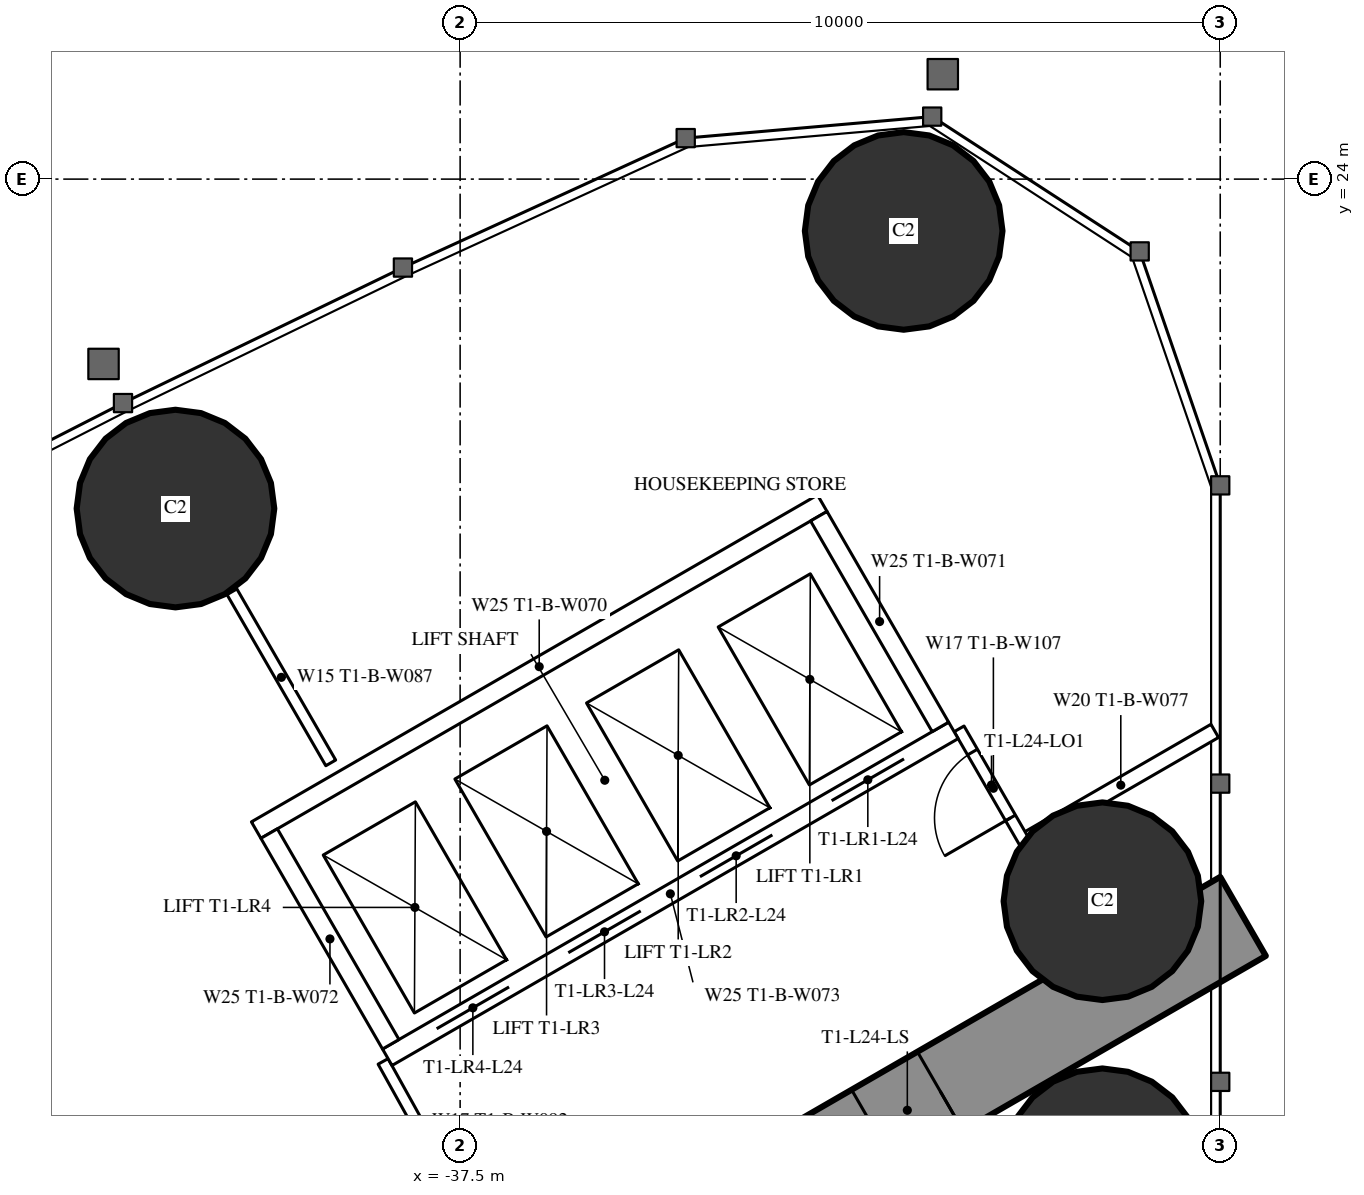
"""IFC4 building model, lengths in metres.
Left out: names, types, materials, properties, quantities, classifications, styles, units other than length and angle.
Written with IfcOpenShell. Run it as: python <this file> out.ifc"""

import sys

from ifc_helpers import new_model, si_unit, direction, frame, frame_2d, origin, origin_2d, place, context, subcontext, project, spatial, rectangle, hollow_circle, extrude, element, fill, save


model = new_model("IFC4")
c1 = context("Model", 3, precision=1e-05, world=origin(), true_north=direction((0.0, 1.0)))
c2 = subcontext(c1, "Body", "Model", "MODEL_VIEW")
j1 = project(units=[si_unit("LENGTHUNIT", "METRE"), si_unit("PLANEANGLEUNIT", "RADIAN")], contexts=[c1])
p1 = place(None, origin())
s1 = spatial("IfcSite", under=j1, at=p1, CompositionType="ELEMENT")
p2 = place(p1, origin())
s2 = spatial("IfcBuilding", under=s1, at=p2, CompositionType="ELEMENT")
p3 = place(p2, frame((0.0, 0.0, 94.1)))
s3 = spatial("IfcBuildingStorey", under=s2, at=p3, CompositionType="ELEMENT", Elevation=94.1)
for number, where, z_axis, x_axis in (
    (1, (-31.665, 23.318, 0.0), (0.0, 0.0, 1.0), (1.0, 0.0, 0.0)),
    (2, (-29.05, 11.0, 0.0), (0.0, 0.0, 1.0), (1.0, 0.0, 0.0)),
    (3, (-29.05, 14.5, 0.0), (0.0, 0.0, 1.0), (1.0, 0.0, 0.0)),
    (4, (-41.245, 19.666, 0.0), (0.0, 0.0, 1.0), (1.0, 0.0, 0.0)),
):
    element("IfcColumn", number, at=place(p3, frame(where, z_axis=z_axis, x_axis=x_axis)), inside=s3, PredefinedType="COLUMN", context=c2, shape_type="SweptSolid", body=[
        extrude(hollow_circle(Radius=1.3, WallThickness=0.1, at=origin_2d()), origin(), (0.0, 0.0, 1.0), 3.5),
    ])
p4 = place(p3, frame((-27.2, 14.3, 0.0), z_axis=(0.0, 0.0, 1.0), x_axis=(-0.866026593062, -0.499997940104, 0.0)))
e5 = element("IfcWall", 5, at=p4, inside=s3, PredefinedType="SHEAR", context=c2, shape_type="SweptSolid", body=[
    extrude(rectangle(XDim=28.946, YDim=1.2, at=frame_2d((14.473, 0.0))), origin(), (0.0, 0.0, 1.0), 3.5),
])
p5 = place(p4, frame((4.6, 0.0, 0.0)))
e6 = element("IfcOpeningElement", 6, at=p5, cuts=e5, PredefinedType="OPENING", context=c2, shape_type="SweptSolid", body=[
    extrude(rectangle(XDim=1.0, YDim=2.2, at=frame_2d((0.5, 1.1))), frame((0.0, 0.61, 0.0), z_axis=(0.0, -1.0, 0.0), x_axis=(1.0, 0.0, 0.0)), (0.0, 0.0, 1.0), 1.22),
])
p6 = place(p4, frame((13.395, 0.0, 0.0)))
e7 = element("IfcOpeningElement", 7, at=p6, cuts=e5, PredefinedType="OPENING", context=c2, shape_type="SweptSolid", body=[
    extrude(rectangle(XDim=1.8, YDim=2.2, at=frame_2d((0.9, 1.1))), frame((0.0, 0.61, 0.0), z_axis=(0.0, -1.0, 0.0), x_axis=(1.0, 0.0, 0.0)), (0.0, 0.0, 1.0), 1.22),
])
p7 = place(p3, frame((-39.202, 16.32, 0.0), z_axis=(0.0, 0.0, 1.0), x_axis=(-0.499947391036, 0.866055775454, 0.0)))
e8 = element("IfcWall", 8, at=p7, inside=s3, PredefinedType="PARTITIONING", context=c2, shape_type="SweptSolid", body=[
    extrude(rectangle(XDim=2.599, YDim=0.15, at=frame_2d((1.3, 0.0))), origin(), (0.0, 0.0, 1.0), 3.25),
])
p8 = place(p3, frame((-27.572, 16.741, 0.0), z_axis=(0.0, 0.0, 1.0), x_axis=(-0.866034618596, -0.499984039138, 0.0)))
e9 = element("IfcWall", 9, at=p8, inside=s3, PredefinedType="PARTITIONING", context=c2, shape_type="SweptSolid", body=[
    extrude(rectangle(XDim=2.854, YDim=0.2, at=frame_2d((1.427, 0.0))), origin(), (0.0, 0.0, 1.0), 3.25),
])
p9 = place(p3, frame((-38.513, 12.392, 0.0), z_axis=(0.0, 0.0, 1.0), x_axis=(0.485585508183, -0.874189175317, 0.0)))
e10 = element("IfcWall", 10, at=p9, inside=s3, PredefinedType="PARTITIONING", context=c2, shape_type="SweptSolid", body=[
    extrude(rectangle(XDim=1.805, YDim=0.15, at=frame_2d((0.902, 0.0))), origin(), (0.0, 0.0, 1.0), 3.25),
])
p10 = place(p3, frame((-30.033, 15.205, 0.0), z_axis=(0.0, 0.0, 1.0), x_axis=(-0.499980071345, 0.866036909293, 0.0)))
e11 = element("IfcWall", 11, at=p10, inside=s3, PredefinedType="PARTITIONING", context=c2, shape_type="SweptSolid", body=[
    extrude(rectangle(XDim=1.805, YDim=0.15, at=frame_2d((0.902, 0.0))), origin(), (0.0, 0.0, 1.0), 2.2),
])
p11 = place(p10, frame((0.452, 0.0, 0.0)))
e12 = element("IfcOpeningElement", 12, at=p11, cuts=e11, PredefinedType="OPENING", context=c2, shape_type="SweptSolid", body=[
    extrude(rectangle(XDim=1.0, YDim=2.2, at=frame_2d((0.5, 1.1))), frame((0.0, 0.085, 0.0), z_axis=(0.0, -1.0, 0.0), x_axis=(1.0, 0.0, 0.0)), (0.0, 0.0, 1.0), 0.17),
])
p12 = place(p3, frame((-31.01, 16.747, 0.0), z_axis=(0.0, 0.0, 1.0), x_axis=(-0.866028165386, -0.499995216735, 0.0)))
e13 = element("IfcWall", 13, at=p12, inside=s3, PredefinedType="PARTITIONING", context=c2, shape_type="SweptSolid", body=[
    extrude(rectangle(XDim=8.6, YDim=0.25, at=frame_2d((4.3, 0.0))), origin(), (0.0, 0.0, 1.0), 3.25),
])
p13 = place(p12, frame((0.75, 0.0, 0.0)))
e14 = element("IfcOpeningElement", 14, at=p13, cuts=e13, PredefinedType="OPENING", context=c2, shape_type="SweptSolid", body=[
    extrude(rectangle(XDim=1.1, YDim=2.2, at=frame_2d((0.55, 1.1))), frame((0.0, 0.135, 0.0), z_axis=(0.0, -1.0, 0.0), x_axis=(1.0, 0.0, 0.0)), (0.0, 0.0, 1.0), 0.27),
])
p14 = place(p12, frame((2.75, 0.0, 0.0)))
e15 = element("IfcOpeningElement", 15, at=p14, cuts=e13, PredefinedType="OPENING", context=c2, shape_type="SweptSolid", body=[
    extrude(rectangle(XDim=1.1, YDim=2.2, at=frame_2d((0.55, 1.1))), frame((0.0, 0.135, 0.0), z_axis=(0.0, -1.0, 0.0), x_axis=(1.0, 0.0, 0.0)), (0.0, 0.0, 1.0), 0.27),
])
p15 = place(p12, frame((4.75, 0.0, 0.0)))
e16 = element("IfcOpeningElement", 16, at=p15, cuts=e13, PredefinedType="OPENING", context=c2, shape_type="SweptSolid", body=[
    extrude(rectangle(XDim=1.1, YDim=2.2, at=frame_2d((0.55, 1.1))), frame((0.0, 0.135, 0.0), z_axis=(0.0, -1.0, 0.0), x_axis=(1.0, 0.0, 0.0)), (0.0, 0.0, 1.0), 0.27),
])
p16 = place(p12, frame((6.75, 0.0, 0.0)))
e17 = element("IfcOpeningElement", 17, at=p16, cuts=e13, PredefinedType="OPENING", context=c2, shape_type="SweptSolid", body=[
    extrude(rectangle(XDim=1.1, YDim=2.2, at=frame_2d((0.55, 1.1))), frame((0.0, 0.135, 0.0), z_axis=(0.0, -1.0, 0.0), x_axis=(1.0, 0.0, 0.0)), (0.0, 0.0, 1.0), 0.27),
])
p17 = place(p3, frame((-32.736, 19.736, 0.0), z_axis=(0.0, 0.0, 1.0), x_axis=(-0.866028165386, -0.499995216735, 0.0)))
e18 = element("IfcWall", 18, at=p17, inside=s3, PredefinedType="PARTITIONING", context=c2, shape_type="SweptSolid", body=[
    extrude(rectangle(XDim=8.6, YDim=0.25, at=frame_2d((4.3, 0.0))), origin(), (0.0, 0.0, 1.0), 3.25),
])
p18 = place(p3, frame((-31.181, 16.793, 0.0), z_axis=(0.0, 0.0, 1.0), x_axis=(-0.499929347863, 0.866066190972, 0.0)))
e19 = element("IfcWall", 19, at=p18, inside=s3, PredefinedType="PARTITIONING", context=c2, shape_type="SweptSolid", body=[
    extrude(rectangle(XDim=3.201, YDim=0.25, at=frame_2d((1.6, 0.0))), origin(), (0.0, 0.0, 1.0), 3.25),
])
p19 = place(p3, frame((-38.413, 12.618, 0.0), z_axis=(0.0, 0.0, 1.0), x_axis=(-0.499872130319, 0.866099216793, 0.0)))
e20 = element("IfcWall", 20, at=p19, inside=s3, PredefinedType="PARTITIONING", context=c2, shape_type="SweptSolid", body=[
    extrude(rectangle(XDim=3.2, YDim=0.25, at=frame_2d((1.6, 0.0))), origin(), (0.0, 0.0, 1.0), 3.25),
])
p20 = place(p11, origin())
e21 = element("IfcDoor", 21, at=p20, inside=s3, OperationType="SINGLE_SWING_LEFT", PredefinedType="DOOR", context=c2, shape_type="SweptSolid", body=[
    extrude(rectangle(XDim=1.0, YDim=2.2, at=frame_2d((0.5, 1.1))), frame((0.0, 0.025, 0.0), z_axis=(0.0, -1.0, 0.0), x_axis=(1.0, 0.0, 0.0)), (0.0, 0.0, 1.0), 0.05),
])
fill(e12, e21)
p21 = place(p5, origin())
e22 = element("IfcDoor", 22, at=p21, inside=s3, OperationType="SINGLE_SWING_LEFT", PredefinedType="DOOR", context=c2, shape_type="SweptSolid", body=[
    extrude(rectangle(XDim=1.0, YDim=2.2, at=frame_2d((0.5, 1.1))), frame((0.0, 0.025, 0.0), z_axis=(0.0, -1.0, 0.0), x_axis=(1.0, 0.0, 0.0)), (0.0, 0.0, 1.0), 0.05),
])
fill(e6, e22)
p22 = place(p13, origin())
e23 = element("IfcDoor", 23, at=p22, inside=s3, OperationType="DOUBLE_DOOR_SLIDING", PredefinedType="USERDEFINED", context=c2, shape_type="SweptSolid", body=[
    extrude(rectangle(XDim=1.1, YDim=2.2, at=frame_2d((0.55, 1.1))), frame((0.0, 0.025, 0.0), z_axis=(0.0, -1.0, 0.0), x_axis=(1.0, 0.0, 0.0)), (0.0, 0.0, 1.0), 0.05),
])
fill(e14, e23)
p23 = place(p14, origin())
e24 = element("IfcDoor", 24, at=p23, inside=s3, OperationType="DOUBLE_DOOR_SLIDING", PredefinedType="USERDEFINED", context=c2, shape_type="SweptSolid", body=[
    extrude(rectangle(XDim=1.1, YDim=2.2, at=frame_2d((0.55, 1.1))), frame((0.0, 0.025, 0.0), z_axis=(0.0, -1.0, 0.0), x_axis=(1.0, 0.0, 0.0)), (0.0, 0.0, 1.0), 0.05),
])
fill(e15, e24)
p24 = place(p15, origin())
e25 = element("IfcDoor", 25, at=p24, inside=s3, OperationType="DOUBLE_DOOR_SLIDING", PredefinedType="USERDEFINED", context=c2, shape_type="SweptSolid", body=[
    extrude(rectangle(XDim=1.1, YDim=2.2, at=frame_2d((0.55, 1.1))), frame((0.0, 0.025, 0.0), z_axis=(0.0, -1.0, 0.0), x_axis=(1.0, 0.0, 0.0)), (0.0, 0.0, 1.0), 0.05),
])
fill(e16, e25)
p25 = place(p16, origin())
e26 = element("IfcDoor", 26, at=p25, inside=s3, OperationType="DOUBLE_DOOR_SLIDING", PredefinedType="USERDEFINED", context=c2, shape_type="SweptSolid", body=[
    extrude(rectangle(XDim=1.1, YDim=2.2, at=frame_2d((0.55, 1.1))), frame((0.0, 0.025, 0.0), z_axis=(0.0, -1.0, 0.0), x_axis=(1.0, 0.0, 0.0)), (0.0, 0.0, 1.0), 0.05),
])
fill(e17, e26)
save(model, sys.argv[1])
